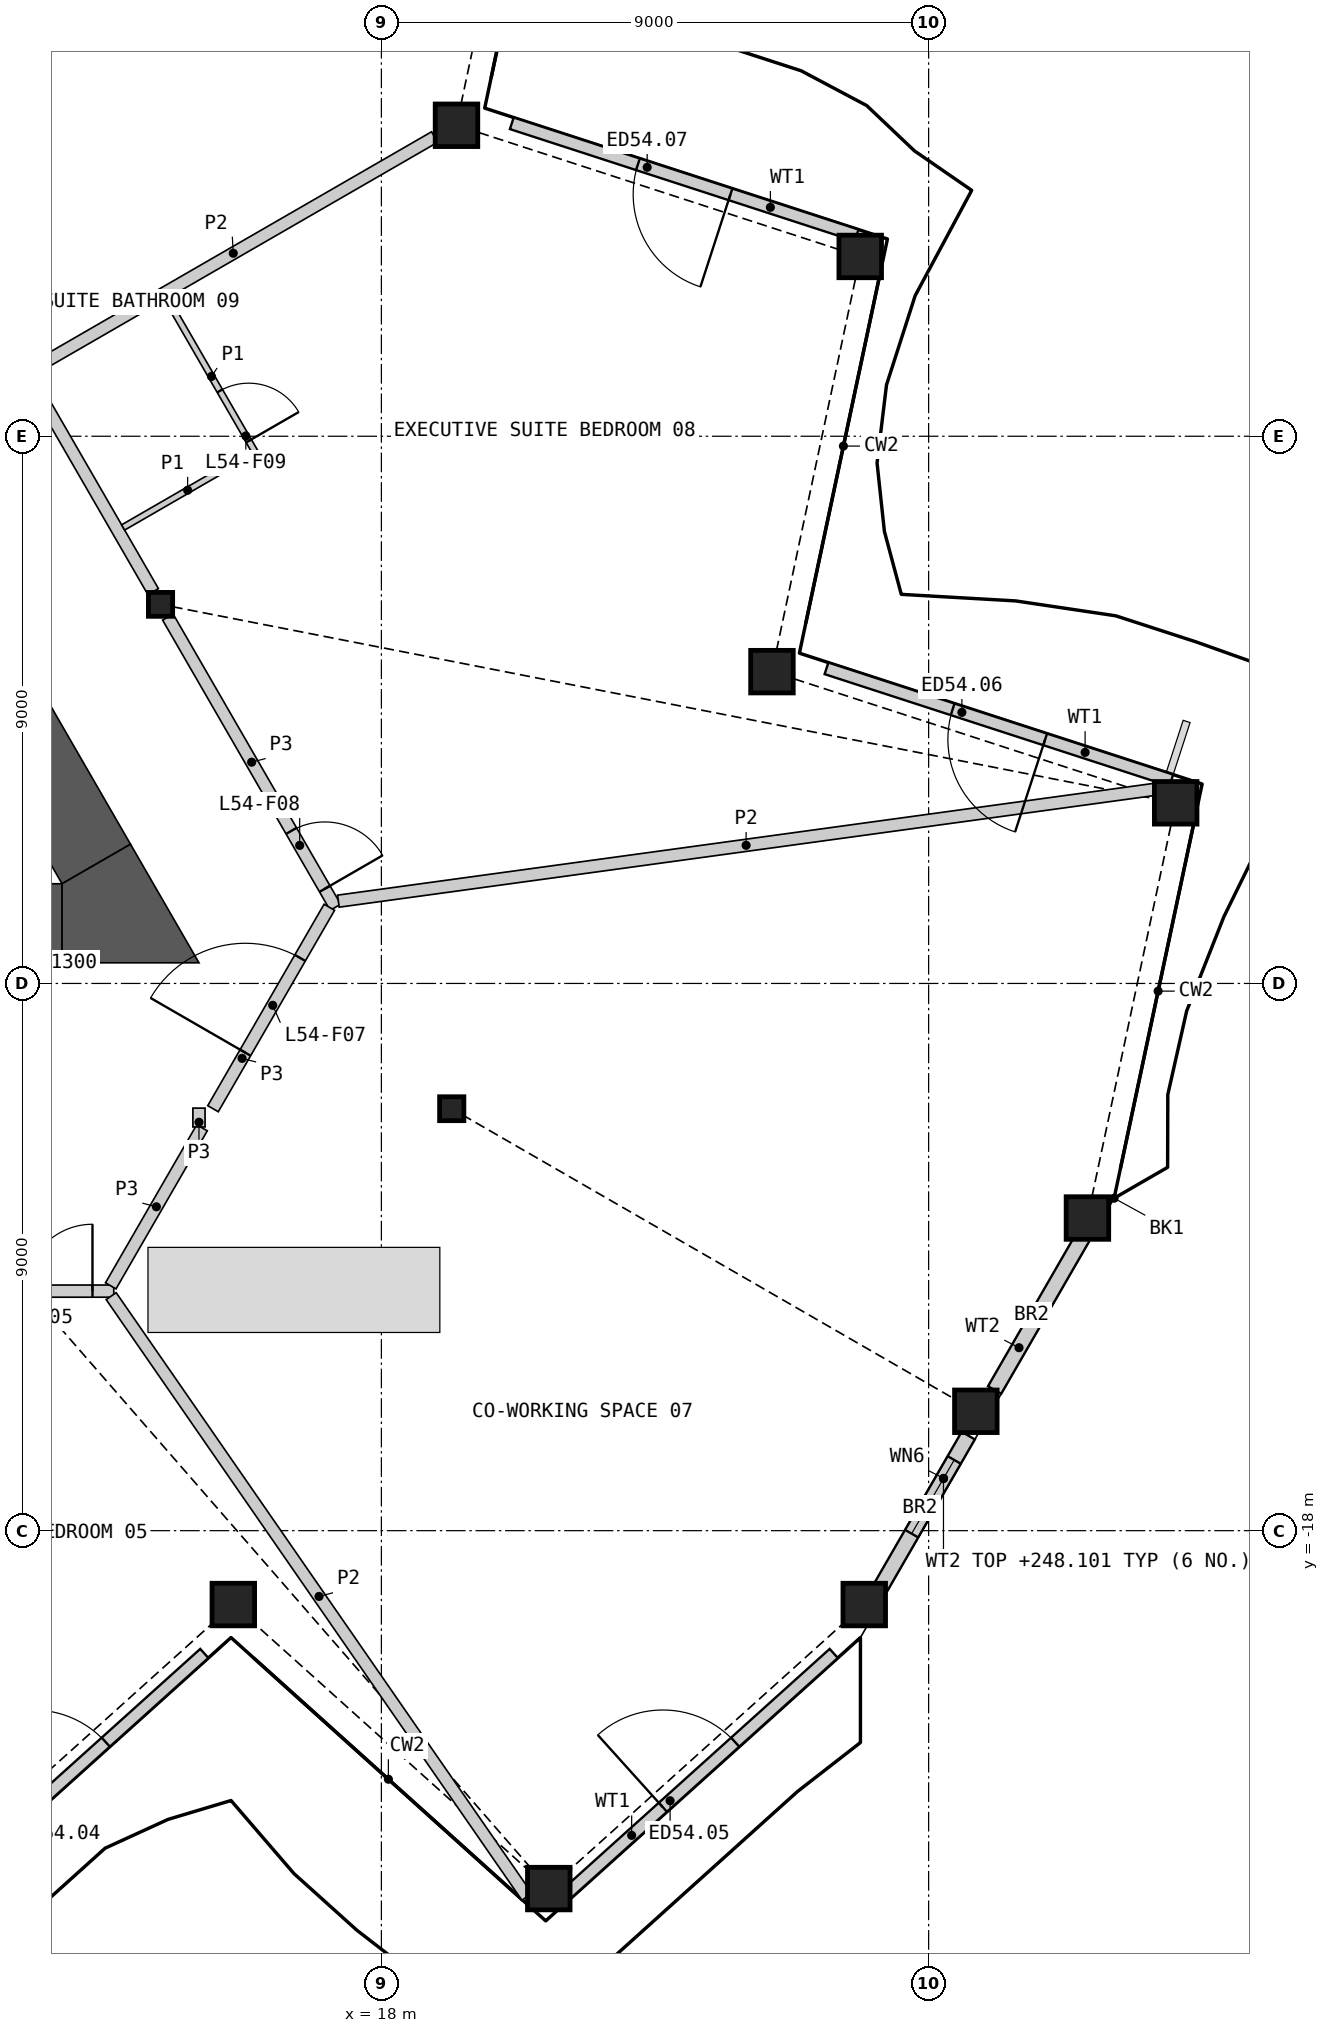
"""IFC4 building model, lengths in metres.
Left out: names, types, materials, properties, quantities, classifications, styles, units other than length and angle.
Written with IfcOpenShell. Run it as: python <this file> out.ifc"""

import sys

from ifc_helpers import new_model, si_unit, direction, frame, frame_2d, origin, origin_2d, place, context, subcontext, project, spatial, polyline, rectangle, hollow_rectangle, i_section, outline, extrude, element, fill, save


model = new_model("IFC4")
c1 = context("Model", 3, precision=1e-05, world=origin(), true_north=direction((0.0, 1.0)))
c2 = subcontext(c1, "Body", "Model", "MODEL_VIEW")
j1 = project(units=[si_unit("LENGTHUNIT", "METRE"), si_unit("PLANEANGLEUNIT", "RADIAN")], contexts=[c1])
p1 = place(None, origin())
s1 = spatial("IfcSite", under=j1, at=p1, CompositionType="ELEMENT")
p2 = place(p1, origin())
s2 = spatial("IfcBuilding", under=s1, at=p2, CompositionType="ELEMENT")
p3 = place(p2, frame((0.0, 0.0, 245.4)))
s3 = spatial("IfcBuildingStorey", under=s2, at=p3, CompositionType="ELEMENT", Elevation=245.4)
for number, where, z_axis, x_axis in (
    (1, (15.565, -19.215, 0.0), (0.0, 0.0, 1.0), (1.0, 0.0, 0.0)),
    (2, (20.753, -23.887, 0.0), (0.0, 0.0, 1.0), (1.0, 0.0, 0.0)),
    (3, (25.941, -19.215, 0.0), (0.0, 0.0, 1.0), (1.0, 0.0, 0.0)),
    (4, (27.776, -16.037, 0.0), (0.0, 0.0, 1.0), (1.0, 0.0, 0.0)),
    (5, (29.612, -12.858, 0.0), (0.0, 0.0, 1.0), (1.0, 0.0, 0.0)),
    (6, (31.063, -6.029, 0.0), (0.0, 0.0, 1.0), (1.0, 0.0, 0.0)),
    (7, (24.423, -3.872, 0.0), (0.0, 0.0, 1.0), (1.0, 0.0, 0.0)),
    (8, (25.875, 2.957, 0.0), (0.0, 0.0, 1.0), (1.0, 0.0, 0.0)),
    (9, (19.235, 5.115, 0.0), (0.0, 0.0, 1.0), (1.0, 0.0, 0.0)),
):
    element("IfcColumn", number, at=place(p3, frame(where, z_axis=z_axis, x_axis=x_axis)), inside=s3, PredefinedType="COLUMN", context=c2, shape_type="SweptSolid", body=[
        extrude(hollow_rectangle(XDim=0.7, YDim=0.7, WallThickness=0.045, at=origin_2d()), origin(), (0.0, 0.0, 1.0), 3.6),
    ])
for number, where, z_axis, x_axis in (
    (10, (19.157, -11.06, 0.0), (0.0, 0.0, 1.0), (1.0, 0.0, 0.0)),
    (11, (14.368, -2.765, 0.0), (0.0, 0.0, 1.0), (1.0, 0.0, 0.0)),
):
    element("IfcColumn", number, at=place(p3, frame(where, z_axis=z_axis, x_axis=x_axis)), inside=s3, PredefinedType="COLUMN", context=c2, shape_type="SweptSolid", body=[
        extrude(i_section(OverallWidth=0.399, OverallDepth=0.393, WebThickness=0.023, FlangeThickness=0.037, at=origin_2d()), origin(), (0.0, 0.0, 1.0), 3.6),
    ])
p4 = place(p3, frame((10.657, -24.009, 0.0), z_axis=(0.0, 0.0, 1.0), x_axis=(0.74315161366, 0.669123067241, 0.0)))
e12 = element("IfcWall", 12, at=p4, inside=s3, PredefinedType="SOLIDWALL", context=c2, shape_type="SweptSolid", body=[
    extrude(rectangle(XDim=5.963, YDim=0.2, at=frame_2d((2.981, 0.0))), origin(), (0.0, 0.0, 1.0), 2.701),
])
p5 = place(p4, frame((2.181, 0.0, 0.0)))
e13 = element("IfcOpeningElement", 13, at=p5, cuts=e12, PredefinedType="OPENING", context=c2, shape_type="SweptSolid", body=[
    extrude(rectangle(XDim=1.6, YDim=2.4, at=frame_2d((0.8, 1.2))), frame((0.0, 0.11, 0.0), z_axis=(0.0, -1.0, 0.0), x_axis=(1.0, 0.0, 0.0)), (0.0, 0.0, 1.0), 0.22),
])
p6 = place(p3, frame((21.008, -24.009, 0.0), z_axis=(0.0, 0.0, 1.0), x_axis=(0.743133280699, 0.669143427912, 0.0)))
e14 = element("IfcWall", 14, at=p6, inside=s3, PredefinedType="SOLIDWALL", context=c2, shape_type="SweptSolid", body=[
    extrude(rectangle(XDim=5.962, YDim=0.2, at=frame_2d((2.981, 0.0))), origin(), (0.0, 0.0, 1.0), 2.701),
])
p7 = place(p6, frame((2.181, 0.0, 0.0)))
e15 = element("IfcOpeningElement", 15, at=p7, cuts=e14, PredefinedType="OPENING", context=c2, shape_type="SweptSolid", body=[
    extrude(rectangle(XDim=1.6, YDim=2.4, at=frame_2d((0.8, 1.2))), frame((0.0, 0.11, 0.0), z_axis=(0.0, -1.0, 0.0), x_axis=(1.0, 0.0, 0.0)), (0.0, 0.0, 1.0), 0.22),
])
p8 = place(p3, frame((26.021, -19.262, 0.0), z_axis=(0.0, 0.0, 1.0), x_axis=(0.500026945261, 0.866009846372, 0.0)))
e16 = element("IfcWall", 16, at=p8, inside=s3, PredefinedType="SOLIDWALL", context=c2, shape_type="SweptSolid", body=[
    extrude(rectangle(XDim=3.262, YDim=0.25, at=frame_2d((1.631, 0.0))), origin(), (0.0, 0.0, 1.0), 2.701),
])
p9 = place(p8, frame((1.4, 0.0, 1.9)))
e17 = element("IfcOpeningElement", 17, at=p9, cuts=e16, PredefinedType="OPENING", context=c2, shape_type="SweptSolid", body=[
    extrude(rectangle(XDim=1.4, YDim=0.6, at=frame_2d((0.7, 0.3))), frame((0.0, 0.135, 0.0), z_axis=(0.0, -1.0, 0.0), x_axis=(1.0, 0.0, 0.0)), (0.0, 0.0, 1.0), 0.27),
])
p10 = place(p3, frame((28.085, -15.687, 0.0), z_axis=(0.0, 0.0, 1.0), x_axis=(0.499987708133, 0.866032500381, 0.0)))
e18 = element("IfcWall", 18, at=p10, inside=s3, PredefinedType="SOLIDWALL", context=c2, shape_type="SweptSolid", body=[
    extrude(rectangle(XDim=3.213, YDim=0.25, at=frame_2d((1.607, 0.0))), origin(), (0.0, 0.0, 1.0), 2.701),
])
p11 = place(p3, frame((30.991, -5.66, 0.0), z_axis=(0.0, 0.0, 1.0), x_axis=(-0.951055430656, 0.309020335608, 0.0)))
e19 = element("IfcWall", 19, at=p11, inside=s3, PredefinedType="SOLIDWALL", context=c2, shape_type="SweptSolid", body=[
    extrude(rectangle(XDim=5.962, YDim=0.2, at=frame_2d((2.981, 0.0))), origin(), (0.0, 0.0, 1.0), 2.701),
])
p12 = place(p11, frame((2.181, 0.0, 0.0)))
e20 = element("IfcOpeningElement", 20, at=p12, cuts=e19, PredefinedType="OPENING", context=c2, shape_type="SweptSolid", body=[
    extrude(rectangle(XDim=1.6, YDim=2.4, at=frame_2d((0.8, 1.2))), frame((0.0, 0.11, 0.0), z_axis=(0.0, -1.0, 0.0), x_axis=(1.0, 0.0, 0.0)), (0.0, 0.0, 1.0), 0.22),
])
p13 = place(p3, frame((25.815, 3.304, 0.0), z_axis=(0.0, 0.0, 1.0), x_axis=(-0.951055430656, 0.309020335608, 0.0)))
e21 = element("IfcWall", 21, at=p13, inside=s3, PredefinedType="SOLIDWALL", context=c2, shape_type="SweptSolid", body=[
    extrude(rectangle(XDim=5.962, YDim=0.2, at=frame_2d((2.981, 0.0))), origin(), (0.0, 0.0, 1.0), 2.701),
])
p14 = place(p13, frame((2.181, 0.0, 0.0)))
e22 = element("IfcOpeningElement", 22, at=p14, cuts=e21, PredefinedType="OPENING", context=c2, shape_type="SweptSolid", body=[
    extrude(rectangle(XDim=1.6, YDim=2.4, at=frame_2d((0.8, 1.2))), frame((0.0, 0.11, 0.0), z_axis=(0.0, -1.0, 0.0), x_axis=(1.0, 0.0, 0.0)), (0.0, 0.0, 1.0), 0.22),
])
p15 = place(p3, frame((8.488, -8.01, 0.0), z_axis=(0.0, 0.0, 1.0), x_axis=(1.0, 0.0, 0.0)))
e23 = element("IfcWall", 23, at=p15, inside=s3, PredefinedType="SHEAR", context=c2, shape_type="SweptSolid", body=[
    extrude(rectangle(XDim=4.26, YDim=1.3, at=frame_2d((2.13, 0.0))), origin(), (0.0, 0.0, 1.0), 3.25),
])
p16 = place(p3, frame((13.311, -7.035, 0.0), z_axis=(0.0, 0.0, 1.0), x_axis=(-0.500012574659, 0.86601814368, 0.0)))
e24 = element("IfcWall", 24, at=p16, inside=s3, PredefinedType="SHEAR", context=c2, shape_type="SweptSolid", body=[
    extrude(rectangle(XDim=4.298, YDim=1.3, at=frame_2d((2.149, 0.0))), origin(), (0.0, 0.0, 1.0), 3.25),
])
p17 = place(p3, origin())
e25 = element("IfcWall", 25, at=p17, inside=s3, PredefinedType="SHEAR", context=c2, shape_type="SweptSolid", body=[
    extrude(outline(polyline([(12.748, -8.66), (12.748, -7.36), (13.874, -6.71), (15.0, -8.66), (12.748, -8.66)])), origin(), (0.0, 0.0, 1.0), 3.25),
])
p18 = place(p3, frame((-13.599, -14.06, 0.0), z_axis=(0.0, 0.0, 1.0), x_axis=(1.0, 0.0, 0.0)))
e26 = element("IfcWall", 26, at=p18, inside=s3, PredefinedType="PARTITIONING", context=c2, shape_type="SweptSolid", body=[
    extrude(rectangle(XDim=27.198, YDim=0.2, at=frame_2d((13.599, 0.0))), origin(), (0.0, 0.0, 1.0), 3.25),
])
p19 = place(p18, frame((1.152, 0.0, 0.0)))
e27 = element("IfcOpeningElement", 27, at=p19, cuts=e26, PredefinedType="OPENING", context=c2, shape_type="SweptSolid", body=[
    extrude(rectangle(XDim=0.95, YDim=2.1, at=frame_2d((0.475, 1.05))), frame((0.0, 0.11, 0.0), z_axis=(0.0, -1.0, 0.0), x_axis=(1.0, 0.0, 0.0)), (0.0, 0.0, 1.0), 0.22),
])
p20 = place(p18, frame((16.311, 0.0, 0.0)))
e28 = element("IfcOpeningElement", 28, at=p20, cuts=e26, PredefinedType="OPENING", context=c2, shape_type="SweptSolid", body=[
    extrude(rectangle(XDim=1.1, YDim=2.1, at=frame_2d((0.55, 1.05))), frame((0.0, 0.11, 0.0), z_axis=(0.0, -1.0, 0.0), x_axis=(1.0, 0.0, 0.0)), (0.0, 0.0, 1.0), 0.22),
])
p21 = place(p18, frame((25.747, 0.0, 0.0)))
e29 = element("IfcOpeningElement", 29, at=p21, cuts=e26, PredefinedType="OPENING", context=c2, shape_type="SweptSolid", body=[
    extrude(rectangle(XDim=1.1, YDim=2.1, at=frame_2d((0.55, 1.05))), frame((0.0, 0.11, 0.0), z_axis=(0.0, -1.0, 0.0), x_axis=(1.0, 0.0, 0.0)), (0.0, 0.0, 1.0), 0.22),
])
p22 = place(p3, frame((9.699, 5.321, 0.0), z_axis=(0.0, 0.0, 1.0), x_axis=(0.49998193945, -0.866035830797, 0.0)))
e30 = element("IfcWall", 30, at=p22, inside=s3, PredefinedType="PARTITIONING", context=c2, shape_type="SweptSolid", body=[
    extrude(rectangle(XDim=9.094, YDim=0.2, at=frame_2d((4.547, 0.0))), origin(), (0.0, 0.0, 1.0), 3.25),
])
p23 = place(p3, frame((14.489, -2.975, 0.0), z_axis=(0.0, 0.0, 1.0), x_axis=(0.500017753321, -0.866015153657, 0.0)))
e31 = element("IfcWall", 31, at=p23, inside=s3, PredefinedType="PARTITIONING", context=c2, shape_type="SweptSolid", body=[
    extrude(rectangle(XDim=5.51, YDim=0.2, at=frame_2d((2.755, 0.0))), origin(), (0.0, 0.0, 1.0), 3.25),
])
p24 = place(p23, frame((4.06, 0.0, 0.0)))
e32 = element("IfcOpeningElement", 32, at=p24, cuts=e31, PredefinedType="OPENING", context=c2, shape_type="SweptSolid", body=[
    extrude(rectangle(XDim=1.1, YDim=2.1, at=frame_2d((0.55, 1.05))), frame((0.0, 0.11, 0.0), z_axis=(0.0, -1.0, 0.0), x_axis=(1.0, 0.0, 0.0)), (0.0, 0.0, 1.0), 0.22),
])
p25 = place(p3, frame((15.231, -11.06, 0.0), z_axis=(0.0, 0.0, 1.0), x_axis=(0.499961815444, 0.866047448526, 0.0)))
e33 = element("IfcWall", 33, at=p25, inside=s3, PredefinedType="PARTITIONING", context=c2, shape_type="SweptSolid", body=[
    extrude(rectangle(XDim=3.826, YDim=0.2, at=frame_2d((1.913, 0.0))), origin(), (0.0, 0.0, 1.0), 3.25),
])
p26 = place(p25, frame((1.064, 0.0, 0.0)))
e34 = element("IfcOpeningElement", 34, at=p26, cuts=e33, PredefinedType="OPENING", context=c2, shape_type="SweptSolid", body=[
    extrude(rectangle(XDim=1.8, YDim=2.1, at=frame_2d((0.9, 1.05))), frame((0.0, 0.11, 0.0), z_axis=(0.0, -1.0, 0.0), x_axis=(1.0, 0.0, 0.0)), (0.0, 0.0, 1.0), 0.22),
])
p27 = place(p3, frame((13.549, -13.974, 0.0), z_axis=(0.0, 0.0, 1.0), x_axis=(0.500048608389, 0.865997337899, 0.0)))
e35 = element("IfcWall", 35, at=p27, inside=s3, PredefinedType="PARTITIONING", context=c2, shape_type="SweptSolid", body=[
    extrude(rectangle(XDim=3.002, YDim=0.2, at=frame_2d((1.501, 0.0))), origin(), (0.0, 0.0, 1.0), 3.25),
])
p28 = place(p3, frame((15.0, -11.36, 0.0), z_axis=(0.0, 0.0, 1.0), x_axis=(0.0, 1.0, 0.0)))
e36 = element("IfcWall", 36, at=p28, inside=s3, PredefinedType="PARTITIONING", context=c2, shape_type="SweptSolid", body=[
    extrude(rectangle(XDim=0.31, YDim=0.2, at=frame_2d((0.155, 0.0))), origin(), (0.0, 0.0, 1.0), 3.25),
])
p29 = place(p3, frame((17.293, -7.646, 0.0), z_axis=(0.0, 0.0, 1.0), x_axis=(0.99075075074, 0.135694325259, 0.0)))
e37 = element("IfcWall", 37, at=p29, inside=s3, PredefinedType="PARTITIONING", context=c2, shape_type="SweptSolid", body=[
    extrude(rectangle(XDim=13.535, YDim=0.2, at=frame_2d((6.768, 0.0))), origin(), (0.0, 0.0, 1.0), 2.404),
])
p30 = place(p3, frame((13.556, -14.143, 0.0), z_axis=(0.0, 0.0, 1.0), x_axis=(0.56913494803, -0.82224413098, 0.0)))
e38 = element("IfcWall", 38, at=p30, inside=s3, PredefinedType="PARTITIONING", context=c2, shape_type="SweptSolid", body=[
    extrude(rectangle(XDim=12.014, YDim=0.2, at=frame_2d((6.007, 0.0))), origin(), (0.0, 0.0, 1.0), 2.404),
])
p31 = place(p3, frame((12.253, 1.098, 0.0), z_axis=(0.0, 0.0, 1.0), x_axis=(0.866026077102, 0.499998833779, 0.0)))
e39 = element("IfcWall", 39, at=p31, inside=s3, PredefinedType="PARTITIONING", context=c2, shape_type="SweptSolid", body=[
    extrude(rectangle(XDim=7.646, YDim=0.2, at=frame_2d((3.823, 0.0))), origin(), (0.0, 0.0, 1.0), 2.404),
])
p32 = place(p3, frame((14.468, 2.261, 0.0), z_axis=(0.0, 0.0, 1.0), x_axis=(0.500037662692, -0.866003658127, 0.0)))
e40 = element("IfcWall", 40, at=p32, inside=s3, PredefinedType="PARTITIONING", context=c2, shape_type="SweptSolid", body=[
    extrude(rectangle(XDim=2.95, YDim=0.1, at=frame_2d((1.475, 0.0))), origin(), (0.0, 0.0, 1.0), 2.404),
])
p33 = place(p32, frame((1.75, 0.0, 0.0)))
e41 = element("IfcOpeningElement", 41, at=p33, cuts=e40, PredefinedType="OPENING", context=c2, shape_type="SweptSolid", body=[
    extrude(rectangle(XDim=0.95, YDim=2.1, at=frame_2d((0.475, 1.05))), frame((0.0, 0.06, 0.0), z_axis=(0.0, -1.0, 0.0), x_axis=(1.0, 0.0, 0.0)), (0.0, 0.0, 1.0), 0.12),
])
p34 = place(p3, frame((13.753, -1.5, 0.0), z_axis=(0.0, 0.0, 1.0), x_axis=(0.866014668023, 0.500018594424, 0.0)))
e42 = element("IfcWall", 42, at=p34, inside=s3, PredefinedType="PARTITIONING", context=c2, shape_type="SweptSolid", body=[
    extrude(rectangle(XDim=2.45, YDim=0.1, at=frame_2d((1.225, 0.0))), origin(), (0.0, 0.0, 1.0), 2.404),
])
p35 = place(p5, origin())
e43 = element("IfcDoor", 43, at=p35, inside=s3, OperationType="DOUBLE_DOOR_SINGLE_SWING", PredefinedType="DOOR", context=c2, shape_type="SweptSolid", body=[
    extrude(rectangle(XDim=1.6, YDim=2.4, at=frame_2d((0.8, 1.2))), frame((0.0, 0.025, 0.0), z_axis=(0.0, -1.0, 0.0), x_axis=(1.0, 0.0, 0.0)), (0.0, 0.0, 1.0), 0.05),
])
fill(e13, e43)
p36 = place(p7, origin())
e44 = element("IfcDoor", 44, at=p36, inside=s3, OperationType="DOUBLE_DOOR_SINGLE_SWING", PredefinedType="DOOR", context=c2, shape_type="SweptSolid", body=[
    extrude(rectangle(XDim=1.6, YDim=2.4, at=frame_2d((0.8, 1.2))), frame((0.0, 0.025, 0.0), z_axis=(0.0, -1.0, 0.0), x_axis=(1.0, 0.0, 0.0)), (0.0, 0.0, 1.0), 0.05),
])
fill(e15, e44)
p37 = place(p9, origin())
e45 = element("IfcWindow", 45, at=p37, inside=s3, PartitioningType="SINGLE_PANEL", PredefinedType="WINDOW", context=c2, shape_type="SweptSolid", body=[
    extrude(rectangle(XDim=1.4, YDim=0.6, at=frame_2d((0.7, 0.3))), frame((0.0, 0.03, 0.0), z_axis=(0.0, -1.0, 0.0), x_axis=(1.0, 0.0, 0.0)), (0.0, 0.0, 1.0), 0.06),
])
fill(e17, e45)
p38 = place(p12, origin())
e46 = element("IfcDoor", 46, at=p38, inside=s3, OperationType="DOUBLE_DOOR_SINGLE_SWING", PredefinedType="DOOR", context=c2, shape_type="SweptSolid", body=[
    extrude(rectangle(XDim=1.6, YDim=2.4, at=frame_2d((0.8, 1.2))), frame((0.0, 0.025, 0.0), z_axis=(0.0, -1.0, 0.0), x_axis=(1.0, 0.0, 0.0)), (0.0, 0.0, 1.0), 0.05),
])
fill(e20, e46)
p39 = place(p14, origin())
e47 = element("IfcDoor", 47, at=p39, inside=s3, OperationType="DOUBLE_DOOR_SINGLE_SWING", PredefinedType="DOOR", context=c2, shape_type="SweptSolid", body=[
    extrude(rectangle(XDim=1.6, YDim=2.4, at=frame_2d((0.8, 1.2))), frame((0.0, 0.025, 0.0), z_axis=(0.0, -1.0, 0.0), x_axis=(1.0, 0.0, 0.0)), (0.0, 0.0, 1.0), 0.05),
])
fill(e22, e47)
p40 = place(p21, origin())
e48 = element("IfcDoor", 48, at=p40, inside=s3, OperationType="SINGLE_SWING_RIGHT", PredefinedType="DOOR", context=c2, shape_type="SweptSolid", body=[
    extrude(rectangle(XDim=1.1, YDim=2.1, at=frame_2d((0.55, 1.05))), frame((0.0, 0.025, 0.0), z_axis=(0.0, -1.0, 0.0), x_axis=(1.0, 0.0, 0.0)), (0.0, 0.0, 1.0), 0.05),
])
fill(e29, e48)
p41 = place(p26, origin())
e49 = element("IfcDoor", 49, at=p41, inside=s3, OperationType="DOUBLE_DOOR_SINGLE_SWING", PredefinedType="DOOR", context=c2, shape_type="SweptSolid", body=[
    extrude(rectangle(XDim=1.8, YDim=2.1, at=frame_2d((0.9, 1.05))), frame((0.0, 0.025, 0.0), z_axis=(0.0, -1.0, 0.0), x_axis=(1.0, 0.0, 0.0)), (0.0, 0.0, 1.0), 0.05),
])
fill(e34, e49)
p42 = place(p24, origin())
e50 = element("IfcDoor", 50, at=p42, inside=s3, OperationType="SINGLE_SWING_RIGHT", PredefinedType="DOOR", context=c2, shape_type="SweptSolid", body=[
    extrude(rectangle(XDim=1.1, YDim=2.1, at=frame_2d((0.55, 1.05))), frame((0.0, 0.025, 0.0), z_axis=(0.0, -1.0, 0.0), x_axis=(1.0, 0.0, 0.0)), (0.0, 0.0, 1.0), 0.05),
])
fill(e32, e50)
p43 = place(p33, origin())
e51 = element("IfcDoor", 51, at=p43, inside=s3, OperationType="SINGLE_SWING_RIGHT", PredefinedType="DOOR", context=c2, shape_type="SweptSolid", body=[
    extrude(rectangle(XDim=0.95, YDim=2.1, at=frame_2d((0.475, 1.05))), frame((0.0, 0.025, 0.0), z_axis=(0.0, -1.0, 0.0), x_axis=(1.0, 0.0, 0.0)), (0.0, 0.0, 1.0), 0.05),
])
fill(e41, e51)
save(model, sys.argv[1])
